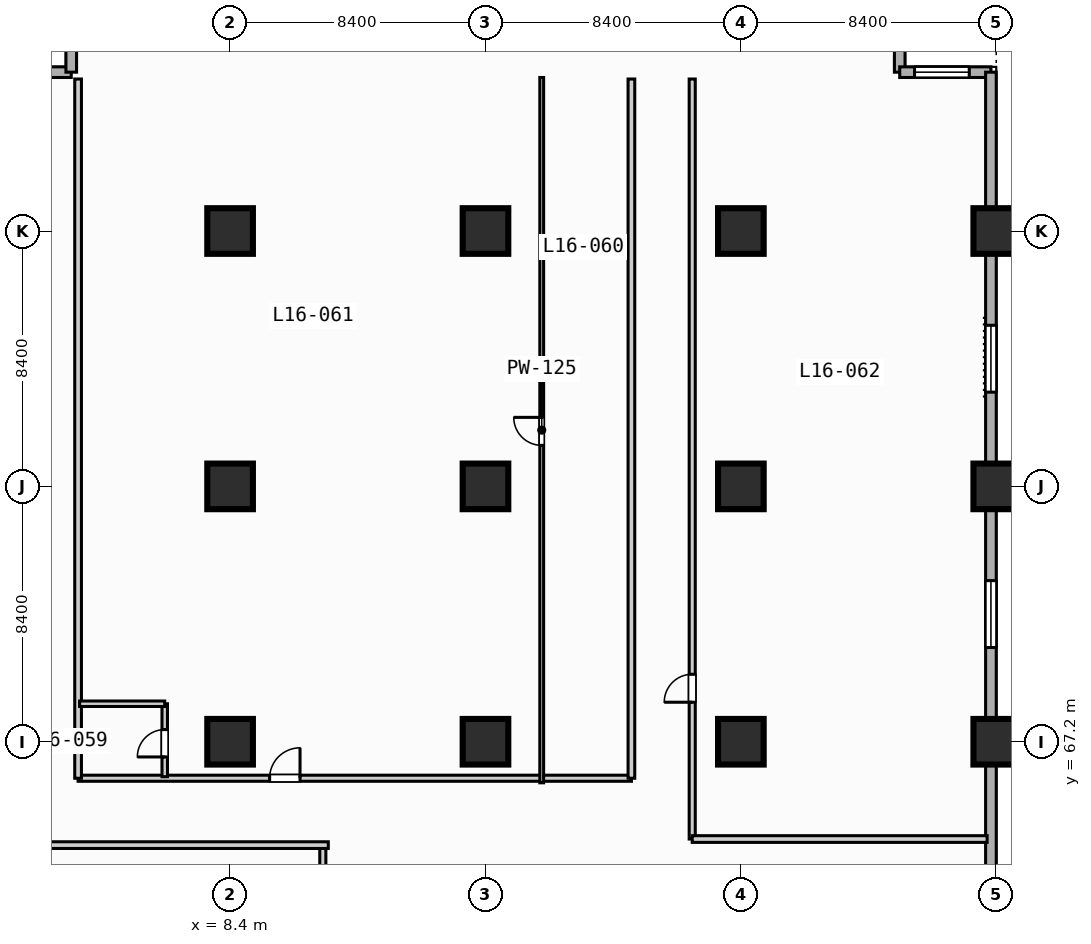
"""IFC4 building model, lengths in metres.
Left out: names, types, materials, properties, quantities, classifications, styles, units other than length and angle.
Written with IfcOpenShell. Run it as: python <this file> out.ifc"""

import sys

from ifc_helpers import new_model, si_unit, direction, frame, frame_2d, origin, origin_2d, place, context, subcontext, project, spatial, rectangle, extrude, element, fill, save


model = new_model("IFC4")
c1 = context("Model", 3, precision=1e-05, world=origin(), true_north=direction((0.0, 1.0)))
c2 = subcontext(c1, "Body", "Model", "MODEL_VIEW")
j1 = project(units=[si_unit("LENGTHUNIT", "METRE"), si_unit("PLANEANGLEUNIT", "RADIAN")], contexts=[c1])
p1 = place(None, origin())
s1 = spatial("IfcSite", under=j1, at=p1, CompositionType="ELEMENT")
p2 = place(p1, origin())
s2 = spatial("IfcBuilding", under=s1, at=p2, CompositionType="ELEMENT")
p3 = place(p2, frame((0.0, 0.0, 70.0)))
s3 = spatial("IfcBuildingStorey", under=s2, at=p3, CompositionType="ELEMENT", Elevation=70.0)
for number, where, z_axis, x_axis in (
    (1, (8.4, 67.2, 0.0), (0.0, 0.0, 1.0), (1.0, 0.0, 0.0)),
    (2, (8.4, 75.6, 0.0), (0.0, 0.0, 1.0), (1.0, 0.0, 0.0)),
    (3, (8.4, 84.0, 0.0), (0.0, 0.0, 1.0), (1.0, 0.0, 0.0)),
    (4, (16.8, 67.2, 0.0), (0.0, 0.0, 1.0), (1.0, 0.0, 0.0)),
    (5, (16.8, 75.6, 0.0), (0.0, 0.0, 1.0), (1.0, 0.0, 0.0)),
    (6, (16.8, 84.0, 0.0), (0.0, 0.0, 1.0), (1.0, 0.0, 0.0)),
    (7, (25.2, 67.2, 0.0), (0.0, 0.0, 1.0), (1.0, 0.0, 0.0)),
    (8, (25.2, 75.6, 0.0), (0.0, 0.0, 1.0), (1.0, 0.0, 0.0)),
    (9, (25.2, 84.0, 0.0), (0.0, 0.0, 1.0), (1.0, 0.0, 0.0)),
    (10, (33.6, 67.2, 0.0), (0.0, 0.0, 1.0), (1.0, 0.0, 0.0)),
    (11, (33.6, 75.6, 0.0), (0.0, 0.0, 1.0), (1.0, 0.0, 0.0)),
    (12, (33.6, 84.0, 0.0), (0.0, 0.0, 1.0), (1.0, 0.0, 0.0)),
):
    element("IfcColumn", number, at=place(p3, frame(where, z_axis=z_axis, x_axis=x_axis)), inside=s3, PredefinedType="COLUMN", context=c2, shape_type="SweptSolid", body=[
        extrude(rectangle(XDim=1.5, YDim=1.5, at=origin_2d()), origin(), (0.0, 0.0, 1.0), 3.8),
    ])
for number, where, z_axis, x_axis in (
    (13, (0.175, 89.225, 0.0), (0.0, 0.0, 1.0), (1.0, 0.0, 0.0)),
    (14, (3.175, 89.225, 0.0), (0.0, 0.0, 1.0), (0.0, 1.0, 0.0)),
    (15, (30.425, 92.225, 0.0), (0.0, 0.0, 1.0), (0.0, -1.0, 0.0)),
):
    element("IfcWall", number, at=place(p3, frame(where, z_axis=z_axis, x_axis=x_axis)), inside=s3, PredefinedType="STANDARD", context=c2, shape_type="SweptSolid", body=[
        extrude(rectangle(XDim=3.0, YDim=0.35, at=frame_2d((1.5, 0.0))), origin(), (0.0, 0.0, 1.0), 3.55),
    ])
p4 = place(p3, frame((30.425, 89.225, 0.0), z_axis=(0.0, 0.0, 1.0), x_axis=(1.0, 0.0, 0.0)))
e16 = element("IfcWall", 16, at=p4, inside=s3, PredefinedType="STANDARD", context=c2, shape_type="SweptSolid", body=[
    extrude(rectangle(XDim=3.0, YDim=0.35, at=frame_2d((1.5, 0.0))), origin(), (0.0, 0.0, 1.0), 3.55),
])
p5 = place(p4, frame((0.488, 0.0, 0.85)))
e17 = element("IfcOpeningElement", 17, at=p5, cuts=e16, PredefinedType="OPENING", context=c2, shape_type="SweptSolid", body=[
    extrude(rectangle(XDim=1.8, YDim=1.8, at=frame_2d((0.9, 0.9))), frame((0.0, 0.185, 0.0), z_axis=(0.0, -1.0, 0.0), x_axis=(1.0, 0.0, 0.0)), (0.0, 0.0, 1.0), 0.37),
])
p6 = place(p3, frame((33.425, 89.225, 0.0), z_axis=(0.0, 0.0, 1.0), x_axis=(0.0, -1.0, 0.0)))
e18 = element("IfcWall", 18, at=p6, inside=s3, PredefinedType="STANDARD", context=c2, shape_type="SweptSolid", body=[
    extrude(rectangle(XDim=55.8, YDim=0.35, at=frame_2d((27.9, 0.0))), origin(), (0.0, 0.0, 1.0), 3.55),
])
p7 = place(p6, frame((16.725, 0.0, 0.85)))
e19 = element("IfcOpeningElement", 19, at=p7, cuts=e18, PredefinedType="OPENING", context=c2, shape_type="SweptSolid", body=[
    extrude(rectangle(XDim=2.2, YDim=1.8, at=frame_2d((1.1, 0.9))), frame((0.0, 0.185, 0.0), z_axis=(0.0, -1.0, 0.0), x_axis=(1.0, 0.0, 0.0)), (0.0, 0.0, 1.0), 0.37),
])
p8 = place(p6, frame((8.325, 0.0, 0.85)))
e20 = element("IfcOpeningElement", 20, at=p8, cuts=e18, PredefinedType="OPENING", context=c2, shape_type="SweptSolid", body=[
    extrude(rectangle(XDim=2.2, YDim=1.8, at=frame_2d((1.1, 0.9))), frame((0.0, 0.185, 0.0), z_axis=(0.0, -1.0, 0.0), x_axis=(1.0, 0.0, 0.0)), (0.0, 0.0, 1.0), 0.37),
])
p9 = place(p3, frame((11.45, 3.4, 0.0), z_axis=(0.0, 0.0, 1.0), x_axis=(0.0, 1.0, 0.0)))
e21 = element("IfcWall", 21, at=p9, inside=s3, PredefinedType="PARTITIONING", context=c2, shape_type="SweptSolid", body=[
    extrude(rectangle(XDim=60.4, YDim=0.2, at=frame_2d((30.2, 0.0))), origin(), (0.0, 0.0, 1.0), 3.55),
])
p10 = place(p9, frame((4.465, 0.0, 0.0)))
e22 = element("IfcOpeningElement", 22, at=p10, cuts=e21, PredefinedType="OPENING", context=c2, shape_type="SweptSolid", body=[
    extrude(rectangle(XDim=1.0, YDim=2.15, at=frame_2d((0.5, 1.075))), frame((0.0, 0.11, 0.0), z_axis=(0.0, -1.0, 0.0), x_axis=(1.0, 0.0, 0.0)), (0.0, 0.0, 1.0), 0.22),
])
p11 = place(p9, frame((14.665, 0.0, 0.0)))
e23 = element("IfcOpeningElement", 23, at=p11, cuts=e21, PredefinedType="OPENING", context=c2, shape_type="SweptSolid", body=[
    extrude(rectangle(XDim=1.0, YDim=2.15, at=frame_2d((0.5, 1.075))), frame((0.0, 0.11, 0.0), z_axis=(0.0, -1.0, 0.0), x_axis=(1.0, 0.0, 0.0)), (0.0, 0.0, 1.0), 0.22),
])
p12 = place(p9, frame((22.535, 0.0, 0.0)))
e24 = element("IfcOpeningElement", 24, at=p12, cuts=e21, PredefinedType="OPENING", context=c2, shape_type="SweptSolid", body=[
    extrude(rectangle(XDim=1.0, YDim=2.15, at=frame_2d((0.5, 1.075))), frame((0.0, 0.11, 0.0), z_axis=(0.0, -1.0, 0.0), x_axis=(1.0, 0.0, 0.0)), (0.0, 0.0, 1.0), 0.22),
])
p13 = place(p9, frame((31.16, 0.0, 0.0)))
e25 = element("IfcOpeningElement", 25, at=p13, cuts=e21, PredefinedType="OPENING", context=c2, shape_type="SweptSolid", body=[
    extrude(rectangle(XDim=1.0, YDim=2.15, at=frame_2d((0.5, 1.075))), frame((0.0, 0.11, 0.0), z_axis=(0.0, -1.0, 0.0), x_axis=(1.0, 0.0, 0.0)), (0.0, 0.0, 1.0), 0.22),
])
p14 = place(p9, frame((42.36, 0.0, 0.0)))
e26 = element("IfcOpeningElement", 26, at=p14, cuts=e21, PredefinedType="OPENING", context=c2, shape_type="SweptSolid", body=[
    extrude(rectangle(XDim=1.0, YDim=2.15, at=frame_2d((0.5, 1.075))), frame((0.0, 0.11, 0.0), z_axis=(0.0, -1.0, 0.0), x_axis=(1.0, 0.0, 0.0)), (0.0, 0.0, 1.0), 0.22),
])
p15 = place(p9, frame((56.065, 0.0, 0.0)))
e27 = element("IfcOpeningElement", 27, at=p15, cuts=e21, PredefinedType="OPENING", context=c2, shape_type="SweptSolid", body=[
    extrude(rectangle(XDim=1.0, YDim=2.15, at=frame_2d((0.5, 1.075))), frame((0.0, 0.11, 0.0), z_axis=(0.0, -1.0, 0.0), x_axis=(1.0, 0.0, 0.0)), (0.0, 0.0, 1.0), 0.22),
])
p16 = place(p3, frame((0.2, 63.8, 0.0), z_axis=(0.0, 0.0, 1.0), x_axis=(1.0, 0.0, 0.0)))
e28 = element("IfcWall", 28, at=p16, inside=s3, PredefinedType="PARTITIONING", context=c2, shape_type="SweptSolid", body=[
    extrude(rectangle(XDim=11.43, YDim=0.22, at=frame_2d((5.715, 0.0))), origin(), (0.0, 0.0, 1.0), 3.55),
])
p17 = place(p3, frame((3.4, 66.0, 0.0), z_axis=(0.0, 0.0, 1.0), x_axis=(1.0, 0.0, 0.0)))
e29 = element("IfcWall", 29, at=p17, inside=s3, PredefinedType="PARTITIONING", context=c2, shape_type="SweptSolid", body=[
    extrude(rectangle(XDim=18.2, YDim=0.2, at=frame_2d((9.1, 0.0))), origin(), (0.0, 0.0, 1.0), 3.55),
])
p18 = place(p17, frame((6.3, 0.0, 0.0)))
e30 = element("IfcOpeningElement", 30, at=p18, cuts=e29, PredefinedType="OPENING", context=c2, shape_type="SweptSolid", body=[
    extrude(rectangle(XDim=1.0, YDim=2.15, at=frame_2d((0.5, 1.075))), frame((0.0, 0.11, 0.0), z_axis=(0.0, -1.0, 0.0), x_axis=(1.0, 0.0, 0.0)), (0.0, 0.0, 1.0), 0.22),
])
for number, where, z_axis, x_axis in (
    (31, (21.6, 66.0, 0.0), (0.0, 0.0, 1.0), (0.0, 1.0, 0.0)),
    (32, (3.4, 66.0, 0.0), (0.0, 0.0, 1.0), (0.0, 1.0, 0.0)),
):
    element("IfcWall", number, at=place(p3, frame(where, z_axis=z_axis, x_axis=x_axis)), inside=s3, PredefinedType="PARTITIONING", context=c2, shape_type="SweptSolid", body=[
        extrude(rectangle(XDim=23.0, YDim=0.22, at=frame_2d((11.5, 0.0))), origin(), (0.0, 0.0, 1.0), 3.55),
    ])
p19 = place(p3, frame((6.25, 66.05, 0.0), z_axis=(0.0, 0.0, 1.0), x_axis=(0.0, 1.0, 0.0)))
e33 = element("IfcWall", 33, at=p19, inside=s3, PredefinedType="PLUMBINGWALL", context=c2, shape_type="SweptSolid", body=[
    extrude(rectangle(XDim=2.4, YDim=0.18, at=frame_2d((1.2, 0.0))), origin(), (0.0, 0.0, 1.0), 3.55),
])
p20 = place(p19, frame((0.65, 0.0, 0.0)))
e34 = element("IfcOpeningElement", 34, at=p20, cuts=e33, PredefinedType="OPENING", context=c2, shape_type="SweptSolid", body=[
    extrude(rectangle(XDim=0.9, YDim=2.1, at=frame_2d((0.45, 1.05))), frame((0.0, 0.1, 0.0), z_axis=(0.0, -1.0, 0.0), x_axis=(1.0, 0.0, 0.0)), (0.0, 0.0, 1.0), 0.2),
])
p21 = place(p3, frame((3.45, 68.45, 0.0), z_axis=(0.0, 0.0, 1.0), x_axis=(1.0, 0.0, 0.0)))
e35 = element("IfcWall", 35, at=p21, inside=s3, PredefinedType="PLUMBINGWALL", context=c2, shape_type="SweptSolid", body=[
    extrude(rectangle(XDim=2.8, YDim=0.18, at=frame_2d((1.4, 0.0))), origin(), (0.0, 0.0, 1.0), 3.55),
])
p22 = place(p3, frame((18.65, 65.85, 0.0), z_axis=(0.0, 0.0, 1.0), x_axis=(0.0, 1.0, 0.0)))
e36 = element("IfcWall", 36, at=p22, inside=s3, PredefinedType="PARTITIONING", context=c2, shape_type="SweptSolid", body=[
    extrude(rectangle(XDim=23.2, YDim=0.125, at=frame_2d((11.6, 0.0))), origin(), (0.0, 0.0, 1.0), 3.55),
])
p23 = place(p22, frame((11.1, 0.0, 0.0)))
e37 = element("IfcOpeningElement", 37, at=p23, cuts=e36, PredefinedType="OPENING", context=c2, shape_type="SweptSolid", body=[
    extrude(rectangle(XDim=0.92, YDim=2.1, at=frame_2d((0.46, 1.05))), frame((0.0, 0.073, 0.0), z_axis=(0.0, -1.0, 0.0), x_axis=(1.0, 0.0, 0.0)), (0.0, 0.0, 1.0), 0.145),
])
p24 = place(p3, frame((23.6, 64.0, 0.0), z_axis=(0.0, 0.0, 1.0), x_axis=(0.0, 1.0, 0.0)))
e38 = element("IfcWall", 38, at=p24, inside=s3, PredefinedType="PARTITIONING", context=c2, shape_type="SweptSolid", body=[
    extrude(rectangle(XDim=25.0, YDim=0.2, at=frame_2d((12.5, 0.0))), origin(), (0.0, 0.0, 1.0), 3.55),
])
p25 = place(p24, frame((4.5, 0.0, 0.0)))
e39 = element("IfcOpeningElement", 39, at=p25, cuts=e38, PredefinedType="OPENING", context=c2, shape_type="SweptSolid", body=[
    extrude(rectangle(XDim=0.92, YDim=2.1, at=frame_2d((0.46, 1.05))), frame((0.0, 0.11, 0.0), z_axis=(0.0, -1.0, 0.0), x_axis=(1.0, 0.0, 0.0)), (0.0, 0.0, 1.0), 0.22),
])
p26 = place(p3, frame((23.6, 64.0, 0.0), z_axis=(0.0, 0.0, 1.0), x_axis=(1.0, 0.0, 0.0)))
e40 = element("IfcWall", 40, at=p26, inside=s3, PredefinedType="PARTITIONING", context=c2, shape_type="SweptSolid", body=[
    extrude(rectangle(XDim=9.7, YDim=0.22, at=frame_2d((4.85, 0.0))), origin(), (0.0, 0.0, 1.0), 3.55),
])
p27 = place(p5, origin())
e41 = element("IfcWindow", 41, at=p27, inside=s3, PartitioningType="SINGLE_PANEL", PredefinedType="WINDOW", context=c2, shape_type="SweptSolid", body=[
    extrude(rectangle(XDim=1.8, YDim=1.8, at=frame_2d((0.9, 0.9))), frame((0.0, 0.03, 0.0), z_axis=(0.0, -1.0, 0.0), x_axis=(1.0, 0.0, 0.0)), (0.0, 0.0, 1.0), 0.06),
])
fill(e17, e41)
p28 = place(p7, origin())
e42 = element("IfcWindow", 42, at=p28, inside=s3, PartitioningType="SINGLE_PANEL", PredefinedType="WINDOW", context=c2, shape_type="SweptSolid", body=[
    extrude(rectangle(XDim=2.2, YDim=1.8, at=frame_2d((1.1, 0.9))), frame((0.0, 0.03, 0.0), z_axis=(0.0, -1.0, 0.0), x_axis=(1.0, 0.0, 0.0)), (0.0, 0.0, 1.0), 0.06),
])
fill(e19, e42)
p29 = place(p8, origin())
e43 = element("IfcWindow", 43, at=p29, inside=s3, PartitioningType="SINGLE_PANEL", PredefinedType="WINDOW", context=c2, shape_type="SweptSolid", body=[
    extrude(rectangle(XDim=2.2, YDim=1.8, at=frame_2d((1.1, 0.9))), frame((0.0, 0.03, 0.0), z_axis=(0.0, -1.0, 0.0), x_axis=(1.0, 0.0, 0.0)), (0.0, 0.0, 1.0), 0.06),
])
fill(e20, e43)
p30 = place(p18, origin())
e44 = element("IfcDoor", 44, at=p30, inside=s3, OperationType="SINGLE_SWING_RIGHT", PredefinedType="DOOR", context=c2, shape_type="SweptSolid", body=[
    extrude(rectangle(XDim=1.0, YDim=2.15, at=frame_2d((0.5, 1.075))), frame((0.0, 0.025, 0.0), z_axis=(0.0, -1.0, 0.0), x_axis=(1.0, 0.0, 0.0)), (0.0, 0.0, 1.0), 0.05),
])
fill(e30, e44)
p31 = place(p20, origin())
e45 = element("IfcDoor", 45, at=p31, inside=s3, OperationType="SINGLE_SWING_LEFT", PredefinedType="DOOR", context=c2, shape_type="SweptSolid", body=[
    extrude(rectangle(XDim=0.9, YDim=2.1, at=frame_2d((0.45, 1.05))), frame((0.0, 0.025, 0.0), z_axis=(0.0, -1.0, 0.0), x_axis=(1.0, 0.0, 0.0)), (0.0, 0.0, 1.0), 0.05),
])
fill(e34, e45)
p32 = place(p23, origin())
e46 = element("IfcDoor", 46, at=p32, inside=s3, OperationType="SINGLE_SWING_RIGHT", PredefinedType="DOOR", context=c2, shape_type="SweptSolid", body=[
    extrude(rectangle(XDim=0.92, YDim=2.1, at=frame_2d((0.46, 1.05))), frame((0.0, 0.025, 0.0), z_axis=(0.0, -1.0, 0.0), x_axis=(1.0, 0.0, 0.0)), (0.0, 0.0, 1.0), 0.05),
])
fill(e37, e46)
p33 = place(p25, origin())
e47 = element("IfcDoor", 47, at=p33, inside=s3, OperationType="SINGLE_SWING_LEFT", PredefinedType="DOOR", context=c2, shape_type="SweptSolid", body=[
    extrude(rectangle(XDim=0.92, YDim=2.1, at=frame_2d((0.46, 1.05))), frame((0.0, 0.025, 0.0), z_axis=(0.0, -1.0, 0.0), x_axis=(1.0, 0.0, 0.0)), (0.0, 0.0, 1.0), 0.05),
])
fill(e39, e47)
save(model, sys.argv[1])
